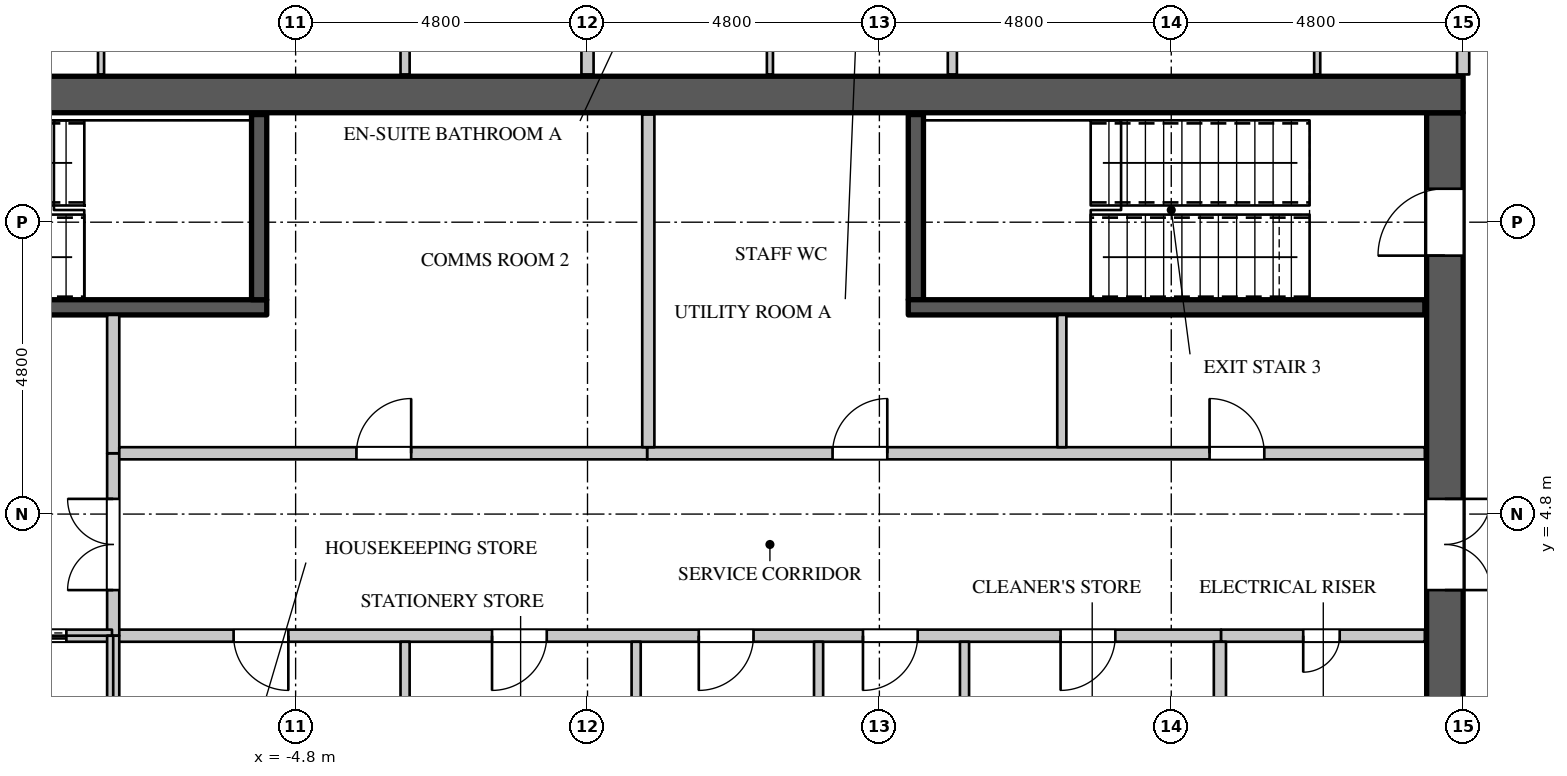
"""IFC4 building model, lengths in metres.
Left out: names, types, materials, properties, quantities, classifications, styles, units other than length and angle.
Written with IfcOpenShell. Run it as: python <this file> out.ifc"""

import sys

from ifc_helpers import new_model, si_unit, direction, frame, frame_2d, origin, place, context, subcontext, project, spatial, rectangle, extrude, element, fill, save


model = new_model("IFC4")
c1 = context("Model", 3, precision=1e-05, world=origin(), true_north=direction((0.0, 1.0)))
c2 = subcontext(c1, "Body", "Model", "MODEL_VIEW")
j1 = project(units=[si_unit("LENGTHUNIT", "METRE"), si_unit("PLANEANGLEUNIT", "RADIAN")], contexts=[c1])
p1 = place(None, origin())
s1 = spatial("IfcSite", under=j1, at=p1, CompositionType="ELEMENT")
p2 = place(p1, origin())
s2 = spatial("IfcBuilding", under=s1, at=p2, CompositionType="ELEMENT")
p3 = place(p2, frame((0.0, 0.0, 272.7)))
s3 = spatial("IfcBuildingStorey", under=s2, at=p3, CompositionType="ELEMENT", Elevation=272.7)
p4 = place(p3, frame((-14.4, 11.7, 0.0), z_axis=(0.0, 0.0, 1.0), x_axis=(1.0, 0.0, 0.0)))
e1 = element("IfcWall", 1, at=p4, inside=s3, PredefinedType="SHEAR", context=c2, shape_type="SweptSolid", body=[
    extrude(rectangle(XDim=28.8, YDim=0.6, at=frame_2d((14.4, 0.0))), origin(), (0.0, 0.0, 1.0), 4.2),
])
p5 = place(p3, frame((14.1, -11.4, 0.0), z_axis=(0.0, 0.0, 1.0), x_axis=(0.0, 1.0, 0.0)))
e2 = element("IfcWall", 2, at=p5, inside=s3, PredefinedType="SHEAR", context=c2, shape_type="SweptSolid", body=[
    extrude(rectangle(XDim=22.8, YDim=0.6, at=frame_2d((11.4, 0.0))), origin(), (0.0, 0.0, 1.0), 4.2),
])
p6 = place(p5, frame((20.45, 0.0, 0.0)))
e3 = element("IfcOpeningElement", 3, at=p6, cuts=e2, PredefinedType="OPENING", context=c2, shape_type="SweptSolid", body=[
    extrude(rectangle(XDim=1.1, YDim=2.2, at=frame_2d((0.55, 1.1))), frame((0.0, 0.31, 0.0), z_axis=(0.0, -1.0, 0.0), x_axis=(1.0, 0.0, 0.0)), (0.0, 0.0, 1.0), 0.62),
])
p7 = place(p5, frame((1.25, 0.0, 0.0)))
e4 = element("IfcOpeningElement", 4, at=p7, cuts=e2, PredefinedType="OPENING", context=c2, shape_type="SweptSolid", body=[
    extrude(rectangle(XDim=1.1, YDim=2.2, at=frame_2d((0.55, 1.1))), frame((0.0, 0.31, 0.0), z_axis=(0.0, -1.0, 0.0), x_axis=(1.0, 0.0, 0.0)), (0.0, 0.0, 1.0), 0.62),
])
p8 = place(p5, frame((14.95, 0.0, 0.0)))
e5 = element("IfcOpeningElement", 5, at=p8, cuts=e2, PredefinedType="OPENING", context=c2, shape_type="SweptSolid", body=[
    extrude(rectangle(XDim=1.5, YDim=2.4, at=frame_2d((0.75, 1.2))), frame((0.0, 0.31, 0.0), z_axis=(0.0, -1.0, 0.0), x_axis=(1.0, 0.0, 0.0)), (0.0, 0.0, 1.0), 0.62),
])
p9 = place(p5, frame((6.35, 0.0, 0.0)))
e6 = element("IfcOpeningElement", 6, at=p9, cuts=e2, PredefinedType="OPENING", context=c2, shape_type="SweptSolid", body=[
    extrude(rectangle(XDim=1.5, YDim=2.4, at=frame_2d((0.75, 1.2))), frame((0.0, 0.31, 0.0), z_axis=(0.0, -1.0, 0.0), x_axis=(1.0, 0.0, 0.0)), (0.0, 0.0, 1.0), 0.62),
])
p10 = place(p3, frame((-7.82, 2.8, 0.0), z_axis=(0.0, 0.0, 1.0), x_axis=(1.0, 0.0, 0.0)))
e7 = element("IfcWall", 7, at=p10, inside=s3, PredefinedType="PARTITIONING", context=c2, shape_type="SweptSolid", body=[
    extrude(rectangle(XDim=18.24, YDim=0.2, at=frame_2d((9.12, 0.0))), origin(), (0.0, 0.0, 1.0), 3.95),
])
p11 = place(p10, frame((2.0, 0.0, 0.0)))
e8 = element("IfcOpeningElement", 8, at=p11, cuts=e7, PredefinedType="OPENING", context=c2, shape_type="SweptSolid", body=[
    extrude(rectangle(XDim=0.9, YDim=2.2, at=frame_2d((0.45, 1.1))), frame((0.0, 0.11, 0.0), z_axis=(0.0, -1.0, 0.0), x_axis=(1.0, 0.0, 0.0)), (0.0, 0.0, 1.0), 0.22),
])
p12 = place(p10, frame((6.25, 0.0, 0.0)))
e9 = element("IfcOpeningElement", 9, at=p12, cuts=e7, PredefinedType="OPENING", context=c2, shape_type="SweptSolid", body=[
    extrude(rectangle(XDim=0.9, YDim=2.2, at=frame_2d((0.45, 1.1))), frame((0.0, 0.11, 0.0), z_axis=(0.0, -1.0, 0.0), x_axis=(1.0, 0.0, 0.0)), (0.0, 0.0, 1.0), 0.22),
])
p13 = place(p10, frame((9.65, 0.0, 0.0)))
e10 = element("IfcOpeningElement", 10, at=p13, cuts=e7, PredefinedType="OPENING", context=c2, shape_type="SweptSolid", body=[
    extrude(rectangle(XDim=0.9, YDim=2.2, at=frame_2d((0.45, 1.1))), frame((0.0, 0.11, 0.0), z_axis=(0.0, -1.0, 0.0), x_axis=(1.0, 0.0, 0.0)), (0.0, 0.0, 1.0), 0.22),
])
p14 = place(p10, frame((12.35, 0.0, 0.0)))
e11 = element("IfcOpeningElement", 11, at=p14, cuts=e7, PredefinedType="OPENING", context=c2, shape_type="SweptSolid", body=[
    extrude(rectangle(XDim=0.9, YDim=2.2, at=frame_2d((0.45, 1.1))), frame((0.0, 0.11, 0.0), z_axis=(0.0, -1.0, 0.0), x_axis=(1.0, 0.0, 0.0)), (0.0, 0.0, 1.0), 0.22),
])
p15 = place(p10, frame((15.6, 0.0, 0.0)))
e12 = element("IfcOpeningElement", 12, at=p15, cuts=e7, PredefinedType="OPENING", context=c2, shape_type="SweptSolid", body=[
    extrude(rectangle(XDim=0.9, YDim=2.2, at=frame_2d((0.45, 1.1))), frame((0.0, 0.11, 0.0), z_axis=(0.0, -1.0, 0.0), x_axis=(1.0, 0.0, 0.0)), (0.0, 0.0, 1.0), 0.22),
])
p16 = place(p3, frame((-7.8, 2.8, 0.0), z_axis=(0.0, 0.0, 1.0), x_axis=(0.0, 1.0, 0.0)))
e13 = element("IfcWall", 13, at=p16, inside=s3, PredefinedType="PARTITIONING", context=c2, shape_type="SweptSolid", body=[
    extrude(rectangle(XDim=3.0, YDim=0.2, at=frame_2d((1.5, 0.0))), origin(), (0.0, 0.0, 1.0), 3.95),
])
p17 = place(p16, frame((0.75, 0.0, 0.0)))
e14 = element("IfcOpeningElement", 14, at=p17, cuts=e13, PredefinedType="OPENING", context=c2, shape_type="SweptSolid", body=[
    extrude(rectangle(XDim=1.5, YDim=2.4, at=frame_2d((0.75, 1.2))), frame((0.0, 0.11, 0.0), z_axis=(0.0, -1.0, 0.0), x_axis=(1.0, 0.0, 0.0)), (0.0, 0.0, 1.0), 0.22),
])
p18 = place(p3, frame((0.98, 5.8, 0.0), z_axis=(0.0, 0.0, 1.0), x_axis=(1.0, 0.0, 0.0)))
e15 = element("IfcWall", 15, at=p18, inside=s3, PredefinedType="PARTITIONING", context=c2, shape_type="SweptSolid", body=[
    extrude(rectangle(XDim=12.79, YDim=0.2, at=frame_2d((6.395, 0.0))), origin(), (0.0, 0.0, 1.0), 3.95),
])
p19 = place(p18, frame((3.05, 0.0, 0.0)))
e16 = element("IfcOpeningElement", 16, at=p19, cuts=e15, PredefinedType="OPENING", context=c2, shape_type="SweptSolid", body=[
    extrude(rectangle(XDim=0.9, YDim=2.2, at=frame_2d((0.45, 1.1))), frame((0.0, 0.11, 0.0), z_axis=(0.0, -1.0, 0.0), x_axis=(1.0, 0.0, 0.0)), (0.0, 0.0, 1.0), 0.22),
])
p20 = place(p18, frame((9.25, 0.0, 0.0)))
e17 = element("IfcOpeningElement", 17, at=p20, cuts=e15, PredefinedType="OPENING", context=c2, shape_type="SweptSolid", body=[
    extrude(rectangle(XDim=0.9, YDim=2.2, at=frame_2d((0.45, 1.1))), frame((0.0, 0.11, 0.0), z_axis=(0.0, -1.0, 0.0), x_axis=(1.0, 0.0, 0.0)), (0.0, 0.0, 1.0), 0.22),
])
p21 = place(p3, frame((14.4, 12.03, 0.0), z_axis=(0.0, 0.0, 1.0), x_axis=(0.0, 1.0, 0.0)))
e18 = element("IfcWall", 18, at=p21, inside=s3, PredefinedType="PARTITIONING", context=c2, shape_type="SweptSolid", body=[
    extrude(rectangle(XDim=2.27, YDim=0.2, at=frame_2d((1.135, 0.0))), origin(), (0.0, 0.0, 1.0), 3.95),
])
p22 = place(p3, frame((-3.0, 0.1, 0.0), z_axis=(0.0, 0.0, 1.0), x_axis=(0.0, 1.0, 0.0)))
e19 = element("IfcWall", 19, at=p22, inside=s3, PredefinedType="PARTITIONING", context=c2, shape_type="SweptSolid", body=[
    extrude(rectangle(XDim=2.6, YDim=0.15, at=frame_2d((1.3, 0.0))), origin(), (0.0, 0.0, 1.0), 3.95),
])
p23 = place(p3, frame((-3.0, 12.03, 0.0), z_axis=(0.0, 0.0, 1.0), x_axis=(0.0, 1.0, 0.0)))
e20 = element("IfcWall", 20, at=p23, inside=s3, PredefinedType="PARTITIONING", context=c2, shape_type="SweptSolid", body=[
    extrude(rectangle(XDim=5.895, YDim=0.15, at=frame_2d((2.948, 0.0))), origin(), (0.0, 0.0, 1.0), 3.95),
])
for number, where, z_axis, x_axis in (
    (21, (0.8, 0.1, 0.0), (0.0, 0.0, 1.0), (0.0, 1.0, 0.0)),
    (22, (3.8, 0.1, 0.0), (0.0, 0.0, 1.0), (0.0, 1.0, 0.0)),
):
    element("IfcWall", number, at=place(p3, frame(where, z_axis=z_axis, x_axis=x_axis)), inside=s3, PredefinedType="PARTITIONING", context=c2, shape_type="SweptSolid", body=[
        extrude(rectangle(XDim=2.6, YDim=0.15, at=frame_2d((1.3, 0.0))), origin(), (0.0, 0.0, 1.0), 3.95),
    ])
p24 = place(p3, frame((6.0, 12.03, 0.0), z_axis=(0.0, 0.0, 1.0), x_axis=(0.0, 1.0, 0.0)))
e23 = element("IfcWall", 23, at=p24, inside=s3, PredefinedType="PARTITIONING", context=c2, shape_type="SweptSolid", body=[
    extrude(rectangle(XDim=5.895, YDim=0.15, at=frame_2d((2.948, 0.0))), origin(), (0.0, 0.0, 1.0), 3.95),
])
p25 = place(p24, frame((2.5, 0.0, 0.0)))
e24 = element("IfcOpeningElement", 24, at=p25, cuts=e23, PredefinedType="OPENING", context=c2, shape_type="SweptSolid", body=[
    extrude(rectangle(XDim=0.9, YDim=2.2, at=frame_2d((0.45, 1.1))), frame((0.0, 0.085, 0.0), z_axis=(0.0, -1.0, 0.0), x_axis=(1.0, 0.0, 0.0)), (0.0, 0.0, 1.0), 0.17),
])
p26 = place(p3, frame((6.2, 0.1, 0.0), z_axis=(0.0, 0.0, 1.0), x_axis=(0.0, 1.0, 0.0)))
e25 = element("IfcWall", 25, at=p26, inside=s3, PredefinedType="PARTITIONING", context=c2, shape_type="SweptSolid", body=[
    extrude(rectangle(XDim=2.6, YDim=0.15, at=frame_2d((1.3, 0.0))), origin(), (0.0, 0.0, 1.0), 3.95),
])
p27 = place(p3, frame((7.8, 5.9, 0.0), z_axis=(0.0, 0.0, 1.0), x_axis=(0.0, 1.0, 0.0)))
e26 = element("IfcWall", 26, at=p27, inside=s3, PredefinedType="PARTITIONING", context=c2, shape_type="SweptSolid", body=[
    extrude(rectangle(XDim=2.175, YDim=0.15, at=frame_2d((1.087, 0.0))), origin(), (0.0, 0.0, 1.0), 3.95),
])
p28 = place(p3, frame((0.0, 12.03, 0.0), z_axis=(0.0, 0.0, 1.0), x_axis=(0.0, 1.0, 0.0)))
e27 = element("IfcWall", 27, at=p28, inside=s3, PredefinedType="PARTITIONING", context=c2, shape_type="SweptSolid", body=[
    extrude(rectangle(XDim=14.425, YDim=0.2, at=frame_2d((7.212, 0.0))), origin(), (0.0, 0.0, 1.0), 3.95),
])
p29 = place(p3, frame((-7.8, 5.8, 0.0), z_axis=(0.0, 0.0, 1.0), x_axis=(0.0, 1.0, 0.0)))
e28 = element("IfcWall", 28, at=p29, inside=s3, PredefinedType="PARTITIONING", context=c2, shape_type="SweptSolid", body=[
    extrude(rectangle(XDim=2.275, YDim=0.2, at=frame_2d((1.137, 0.0))), origin(), (0.0, 0.0, 1.0), 3.95),
])
p30 = place(p3, frame((-7.7, 5.8, 0.0), z_axis=(0.0, 0.0, 1.0), x_axis=(1.0, 0.0, 0.0)))
e29 = element("IfcWall", 29, at=p30, inside=s3, PredefinedType="PARTITIONING", context=c2, shape_type="SweptSolid", body=[
    extrude(rectangle(XDim=8.68, YDim=0.2, at=frame_2d((4.34, 0.0))), origin(), (0.0, 0.0, 1.0), 3.95),
])
p31 = place(p30, frame((3.9, 0.0, 0.0)))
e30 = element("IfcOpeningElement", 30, at=p31, cuts=e29, PredefinedType="OPENING", context=c2, shape_type="SweptSolid", body=[
    extrude(rectangle(XDim=0.9, YDim=2.2, at=frame_2d((0.45, 1.1))), frame((0.0, 0.11, 0.0), z_axis=(0.0, -1.0, 0.0), x_axis=(1.0, 0.0, 0.0)), (0.0, 0.0, 1.0), 0.22),
])
p32 = place(p3, frame((1.0, 5.9, 0.0), z_axis=(0.0, 0.0, 1.0), x_axis=(0.0, 1.0, 0.0)))
e31 = element("IfcWall", 31, at=p32, inside=s3, PredefinedType="PARTITIONING", context=c2, shape_type="SweptSolid", body=[
    extrude(rectangle(XDim=5.47, YDim=0.2, at=frame_2d((2.735, 0.0))), origin(), (0.0, 0.0, 1.0), 3.95),
])
p33 = place(p3, frame((10.42, 2.8, 0.0), z_axis=(0.0, 0.0, 1.0), x_axis=(1.0, 0.0, 0.0)))
e32 = element("IfcWall", 32, at=p33, inside=s3, PredefinedType="PARTITIONING", context=c2, shape_type="SweptSolid", body=[
    extrude(rectangle(XDim=3.35, YDim=0.2, at=frame_2d((1.675, 0.0))), origin(), (0.0, 0.0, 1.0), 3.95),
])
p34 = place(p33, frame((1.35, 0.0, 0.0)))
e33 = element("IfcOpeningElement", 33, at=p34, cuts=e32, PredefinedType="OPENING", context=c2, shape_type="SweptSolid", body=[
    extrude(rectangle(XDim=0.6, YDim=2.0, at=frame_2d((0.3, 1.0))), frame((0.0, 0.11, 0.0), z_axis=(0.0, -1.0, 0.0), x_axis=(1.0, 0.0, 0.0)), (0.0, 0.0, 1.0), 0.22),
])
p35 = place(p3, frame((10.4, 0.1, 0.0), z_axis=(0.0, 0.0, 1.0), x_axis=(0.0, 1.0, 0.0)))
e34 = element("IfcWall", 34, at=p35, inside=s3, PredefinedType="PARTITIONING", context=c2, shape_type="SweptSolid", body=[
    extrude(rectangle(XDim=2.6, YDim=0.2, at=frame_2d((1.3, 0.0))), origin(), (0.0, 0.0, 1.0), 3.95),
])
p36 = place(p3, frame((-13.77, 2.8, 0.0), z_axis=(0.0, 0.0, 1.0), x_axis=(1.0, 0.0, 0.0)))
e35 = element("IfcWall", 35, at=p36, inside=s3, PredefinedType="PARTITIONING", context=c2, shape_type="SweptSolid", body=[
    extrude(rectangle(XDim=5.95, YDim=0.2, at=frame_2d((2.975, 0.0))), origin(), (0.0, 0.0, 1.0), 3.95),
])
p37 = place(p36, frame((1.1, 0.0, 0.0)))
e36 = element("IfcOpeningElement", 36, at=p37, cuts=e35, PredefinedType="OPENING", context=c2, shape_type="SweptSolid", body=[
    extrude(rectangle(XDim=1.1, YDim=2.2, at=frame_2d((0.55, 1.1))), frame((0.0, 0.11, 0.0), z_axis=(0.0, -1.0, 0.0), x_axis=(1.0, 0.0, 0.0)), (0.0, 0.0, 1.0), 0.22),
])
p38 = place(p36, frame((4.1, 0.0, 0.0)))
e37 = element("IfcOpeningElement", 37, at=p38, cuts=e35, PredefinedType="OPENING", context=c2, shape_type="SweptSolid", body=[
    extrude(rectangle(XDim=1.1, YDim=2.2, at=frame_2d((0.55, 1.1))), frame((0.0, 0.11, 0.0), z_axis=(0.0, -1.0, 0.0), x_axis=(1.0, 0.0, 0.0)), (0.0, 0.0, 1.0), 0.22),
])
p39 = place(p3, frame((-7.8, 0.0, 0.0), z_axis=(0.0, 0.0, 1.0), x_axis=(0.0, 1.0, 0.0)))
e38 = element("IfcWall", 38, at=p39, inside=s3, PredefinedType="PARTITIONING", context=c2, shape_type="SweptSolid", body=[
    extrude(rectangle(XDim=2.8, YDim=0.2, at=frame_2d((1.4, 0.0))), origin(), (0.0, 0.0, 1.0), 3.95),
])
p40 = place(p3, frame((-13.77, 8.2, 0.0), z_axis=(0.0, 0.0, 1.0), x_axis=(1.0, 0.0, 0.0)))
e39 = element("IfcWall", 39, at=p40, inside=s3, PredefinedType="SHEAR", context=c2, shape_type="SweptSolid", body=[
    extrude(rectangle(XDim=8.495, YDim=0.25, at=frame_2d((4.248, 0.0))), origin(), (0.0, 0.0, 1.0), 3.95),
])
p41 = place(p40, frame((0.15, 0.0, 0.0)))
e40 = element("IfcOpeningElement", 40, at=p41, cuts=e39, PredefinedType="OPENING", context=c2, shape_type="SweptSolid", body=[
    extrude(rectangle(XDim=1.1, YDim=2.2, at=frame_2d((0.55, 1.1))), frame((0.0, 0.135, 0.0), z_axis=(0.0, -1.0, 0.0), x_axis=(1.0, 0.0, 0.0)), (0.0, 0.0, 1.0), 0.27),
])
for number, where, z_axis, x_axis in (
    (41, (-5.4, 8.325, 0.0), (0.0, 0.0, 1.0), (0.0, 1.0, 0.0)),
    (42, (5.4, 8.325, 0.0), (0.0, 0.0, 1.0), (0.0, 1.0, 0.0)),
):
    element("IfcWall", number, at=place(p3, frame(where, z_axis=z_axis, x_axis=x_axis)), inside=s3, PredefinedType="SHEAR", context=c2, shape_type="SweptSolid", body=[
        extrude(rectangle(XDim=3.045, YDim=0.25, at=frame_2d((1.522, 0.0))), origin(), (0.0, 0.0, 1.0), 3.95),
    ])
p42 = place(p3, frame((5.275, 8.2, 0.0), z_axis=(0.0, 0.0, 1.0), x_axis=(1.0, 0.0, 0.0)))
e43 = element("IfcWall", 43, at=p42, inside=s3, PredefinedType="SHEAR", context=c2, shape_type="SweptSolid", body=[
    extrude(rectangle(XDim=8.495, YDim=0.25, at=frame_2d((4.248, 0.0))), origin(), (0.0, 0.0, 1.0), 3.95),
])
p43 = place(p3, frame((-8.0, 12.03, 0.0), z_axis=(0.0, 0.0, 1.0), x_axis=(0.0, 1.0, 0.0)))
e44 = element("IfcWall", 44, at=p43, inside=s3, PredefinedType="PARTITIONING", context=c2, shape_type="SweptSolid", body=[
    extrude(rectangle(XDim=6.395, YDim=0.1, at=frame_2d((3.198, 0.0))), origin(), (0.0, 0.0, 1.0), 3.95),
])
p44 = place(p43, frame((2.75, 0.0, 0.0)))
e45 = element("IfcOpeningElement", 45, at=p44, cuts=e44, PredefinedType="OPENING", context=c2, shape_type="SweptSolid", body=[
    extrude(rectangle(XDim=0.9, YDim=2.2, at=frame_2d((0.45, 1.1))), frame((0.0, 0.06, 0.0), z_axis=(0.0, -1.0, 0.0), x_axis=(1.0, 0.0, 0.0)), (0.0, 0.0, 1.0), 0.12),
])
p45 = place(p3, frame((3.0, 12.03, 0.0), z_axis=(0.0, 0.0, 1.0), x_axis=(0.0, 1.0, 0.0)))
e46 = element("IfcWall", 46, at=p45, inside=s3, PredefinedType="PARTITIONING", context=c2, shape_type="SweptSolid", body=[
    extrude(rectangle(XDim=5.395, YDim=0.1, at=frame_2d((2.698, 0.0))), origin(), (0.0, 0.0, 1.0), 3.95),
])
p46 = place(p3, frame((12.0, 12.03, 0.0), z_axis=(0.0, 0.0, 1.0), x_axis=(0.0, 1.0, 0.0)))
e47 = element("IfcWall", 47, at=p46, inside=s3, PredefinedType="PARTITIONING", context=c2, shape_type="SweptSolid", body=[
    extrude(rectangle(XDim=4.945, YDim=0.1, at=frame_2d((2.473, 0.0))), origin(), (0.0, 0.0, 1.0), 3.95),
])
p47 = place(p46, frame((2.0, 0.0, 0.0)))
e48 = element("IfcOpeningElement", 48, at=p47, cuts=e47, PredefinedType="OPENING", context=c2, shape_type="SweptSolid", body=[
    extrude(rectangle(XDim=0.9, YDim=2.2, at=frame_2d((0.45, 1.1))), frame((0.0, 0.06, 0.0), z_axis=(0.0, -1.0, 0.0), x_axis=(1.0, 0.0, 0.0)), (0.0, 0.0, 1.0), 0.12),
])
p48 = place(p34, origin())
e49 = element("IfcDoor", 49, at=p48, inside=s3, OperationType="SINGLE_SWING_RIGHT", PredefinedType="DOOR", context=c2, shape_type="SweptSolid", body=[
    extrude(rectangle(XDim=0.6, YDim=2.0, at=frame_2d((0.3, 1.0))), frame((0.0, 0.025, 0.0), z_axis=(0.0, -1.0, 0.0), x_axis=(1.0, 0.0, 0.0)), (0.0, 0.0, 1.0), 0.05),
])
fill(e33, e49)
p49 = place(p31, origin())
e50 = element("IfcDoor", 50, at=p49, inside=s3, OperationType="SINGLE_SWING_RIGHT", PredefinedType="DOOR", context=c2, shape_type="SweptSolid", body=[
    extrude(rectangle(XDim=0.9, YDim=2.2, at=frame_2d((0.45, 1.1))), frame((0.0, 0.025, 0.0), z_axis=(0.0, -1.0, 0.0), x_axis=(1.0, 0.0, 0.0)), (0.0, 0.0, 1.0), 0.05),
])
fill(e30, e50)
p50 = place(p19, origin())
e51 = element("IfcDoor", 51, at=p50, inside=s3, OperationType="SINGLE_SWING_RIGHT", PredefinedType="DOOR", context=c2, shape_type="SweptSolid", body=[
    extrude(rectangle(XDim=0.9, YDim=2.2, at=frame_2d((0.45, 1.1))), frame((0.0, 0.025, 0.0), z_axis=(0.0, -1.0, 0.0), x_axis=(1.0, 0.0, 0.0)), (0.0, 0.0, 1.0), 0.05),
])
fill(e16, e51)
p51 = place(p20, origin())
e52 = element("IfcDoor", 52, at=p51, inside=s3, OperationType="SINGLE_SWING_LEFT", PredefinedType="DOOR", context=c2, shape_type="SweptSolid", body=[
    extrude(rectangle(XDim=0.9, YDim=2.2, at=frame_2d((0.45, 1.1))), frame((0.0, 0.025, 0.0), z_axis=(0.0, -1.0, 0.0), x_axis=(1.0, 0.0, 0.0)), (0.0, 0.0, 1.0), 0.05),
])
fill(e17, e52)
p52 = place(p11, origin())
e53 = element("IfcDoor", 53, at=p52, inside=s3, OperationType="SINGLE_SWING_LEFT", PredefinedType="DOOR", context=c2, shape_type="SweptSolid", body=[
    extrude(rectangle(XDim=0.9, YDim=2.2, at=frame_2d((0.45, 1.1))), frame((0.0, 0.025, 0.0), z_axis=(0.0, -1.0, 0.0), x_axis=(1.0, 0.0, 0.0)), (0.0, 0.0, 1.0), 0.05),
])
fill(e8, e53)
p53 = place(p12, origin())
e54 = element("IfcDoor", 54, at=p53, inside=s3, OperationType="SINGLE_SWING_RIGHT", PredefinedType="DOOR", context=c2, shape_type="SweptSolid", body=[
    extrude(rectangle(XDim=0.9, YDim=2.2, at=frame_2d((0.45, 1.1))), frame((0.0, 0.025, 0.0), z_axis=(0.0, -1.0, 0.0), x_axis=(1.0, 0.0, 0.0)), (0.0, 0.0, 1.0), 0.05),
])
fill(e9, e54)
p54 = place(p13, origin())
e55 = element("IfcDoor", 55, at=p54, inside=s3, OperationType="SINGLE_SWING_RIGHT", PredefinedType="DOOR", context=c2, shape_type="SweptSolid", body=[
    extrude(rectangle(XDim=0.9, YDim=2.2, at=frame_2d((0.45, 1.1))), frame((0.0, 0.025, 0.0), z_axis=(0.0, -1.0, 0.0), x_axis=(1.0, 0.0, 0.0)), (0.0, 0.0, 1.0), 0.05),
])
fill(e10, e55)
p55 = place(p14, origin())
e56 = element("IfcDoor", 56, at=p55, inside=s3, OperationType="SINGLE_SWING_RIGHT", PredefinedType="DOOR", context=c2, shape_type="SweptSolid", body=[
    extrude(rectangle(XDim=0.9, YDim=2.2, at=frame_2d((0.45, 1.1))), frame((0.0, 0.025, 0.0), z_axis=(0.0, -1.0, 0.0), x_axis=(1.0, 0.0, 0.0)), (0.0, 0.0, 1.0), 0.05),
])
fill(e11, e56)
p56 = place(p15, origin())
e57 = element("IfcDoor", 57, at=p56, inside=s3, OperationType="SINGLE_SWING_RIGHT", PredefinedType="DOOR", context=c2, shape_type="SweptSolid", body=[
    extrude(rectangle(XDim=0.9, YDim=2.2, at=frame_2d((0.45, 1.1))), frame((0.0, 0.025, 0.0), z_axis=(0.0, -1.0, 0.0), x_axis=(1.0, 0.0, 0.0)), (0.0, 0.0, 1.0), 0.05),
])
fill(e12, e57)
p57 = place(p38, origin())
e58 = element("IfcDoor", 58, at=p57, inside=s3, OperationType="DOUBLE_DOOR_SLIDING", PredefinedType="DOOR", context=c2, shape_type="SweptSolid", body=[
    extrude(rectangle(XDim=1.1, YDim=2.2, at=frame_2d((0.55, 1.1))), frame((0.0, 0.025, 0.0), z_axis=(0.0, -1.0, 0.0), x_axis=(1.0, 0.0, 0.0)), (0.0, 0.0, 1.0), 0.05),
])
fill(e37, e58)
p58 = place(p17, origin())
e59 = element("IfcDoor", 59, at=p58, inside=s3, OperationType="DOUBLE_DOOR_SINGLE_SWING", PredefinedType="DOOR", context=c2, shape_type="SweptSolid", body=[
    extrude(rectangle(XDim=1.5, YDim=2.4, at=frame_2d((0.75, 1.2))), frame((0.0, 0.025, 0.0), z_axis=(0.0, -1.0, 0.0), x_axis=(1.0, 0.0, 0.0)), (0.0, 0.0, 1.0), 0.05),
])
fill(e14, e59)
p59 = place(p6, origin())
e60 = element("IfcDoor", 60, at=p59, inside=s3, OperationType="SINGLE_SWING_LEFT", PredefinedType="DOOR", context=c2, shape_type="SweptSolid", body=[
    extrude(rectangle(XDim=1.1, YDim=2.2, at=frame_2d((0.55, 1.1))), frame((0.0, 0.295, 0.0), z_axis=(0.0, -1.0, 0.0), x_axis=(1.0, 0.0, 0.0)), (0.0, 0.0, 1.0), 0.05),
])
fill(e3, e60)
p60 = place(p8, origin())
e61 = element("IfcDoor", 61, at=p60, inside=s3, OperationType="DOUBLE_DOOR_SINGLE_SWING", PredefinedType="DOOR", context=c2, shape_type="SweptSolid", body=[
    extrude(rectangle(XDim=1.5, YDim=2.4, at=frame_2d((0.75, 1.2))), frame((0.0, -0.245, 0.0), z_axis=(0.0, -1.0, 0.0), x_axis=(1.0, 0.0, 0.0)), (0.0, 0.0, 1.0), 0.05),
])
fill(e5, e61)
save(model, sys.argv[1])
